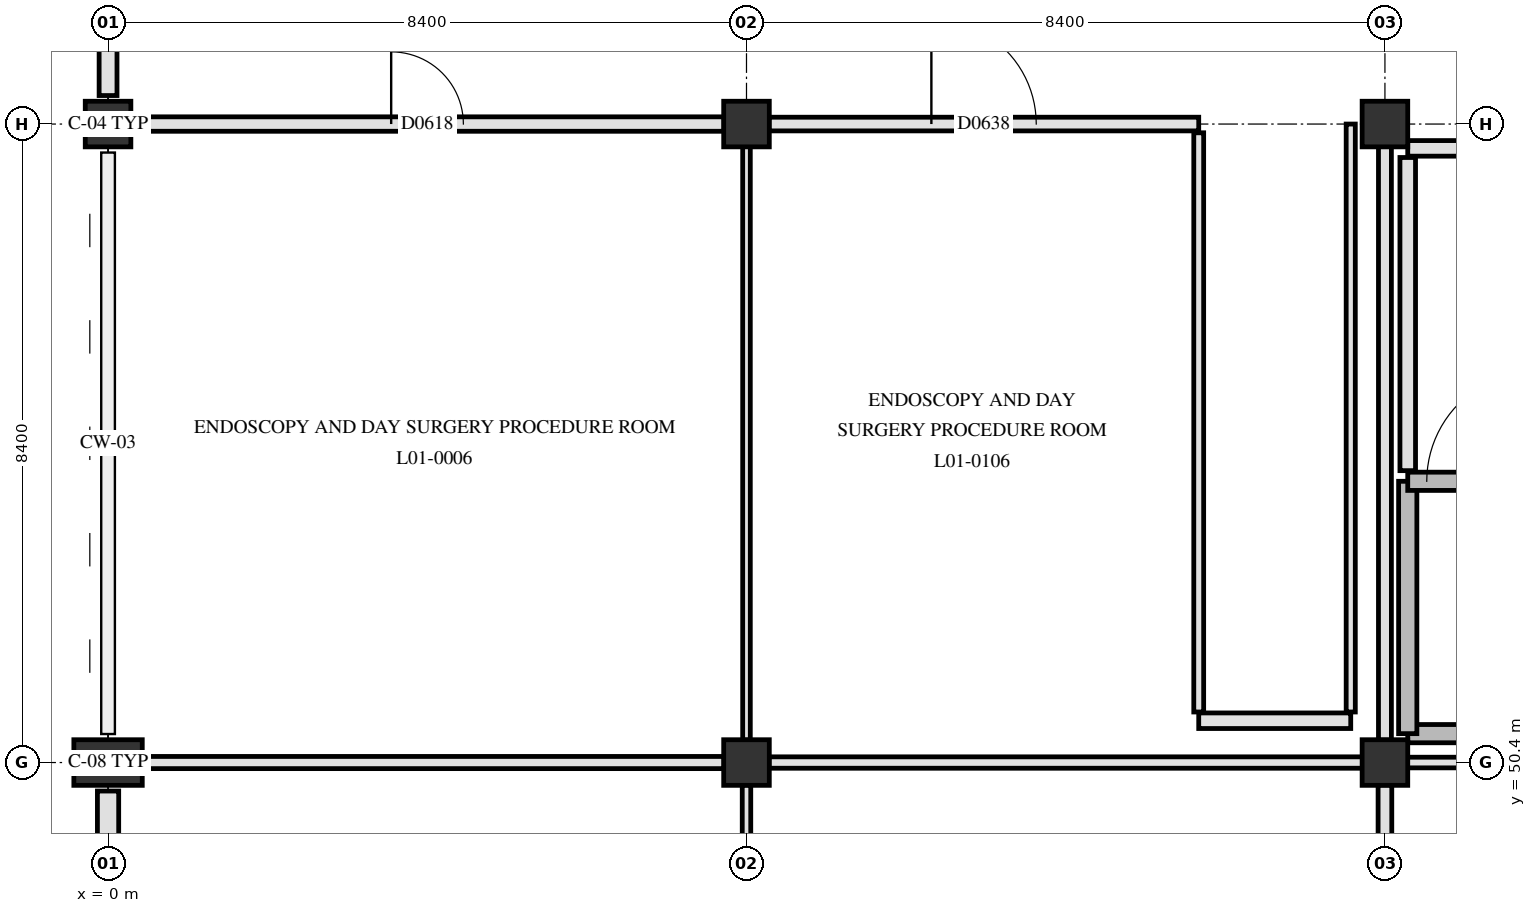
"""IFC4 building model, lengths in metres.
Left out: names, types, materials, properties, quantities, classifications, styles, units other than length and angle.
Written with IfcOpenShell. Run it as: python <this file> out.ifc"""

import sys

from ifc_helpers import new_model, si_unit, direction, frame, frame_2d, origin, origin_2d, place, context, subcontext, project, spatial, rectangle, extrude, element, fill, save


model = new_model("IFC4")
c1 = context("Model", 3, precision=1e-05, world=origin(), true_north=direction((0.0, 1.0)))
c2 = subcontext(c1, "Body", "Model", "MODEL_VIEW")
j1 = project(units=[si_unit("LENGTHUNIT", "METRE"), si_unit("PLANEANGLEUNIT", "RADIAN")], contexts=[c1])
p1 = place(None, origin())
s1 = spatial("IfcSite", under=j1, at=p1, CompositionType="ELEMENT")
p2 = place(p1, origin())
s2 = spatial("IfcBuilding", under=s1, at=p2, CompositionType="ELEMENT")
p3 = place(p2, frame((0.0, 0.0, 4.8)))
s3 = spatial("IfcBuildingStorey", under=s2, at=p3, CompositionType="ELEMENT", Elevation=4.8)
p4 = place(p3, frame((0.0, 50.4, 0.0), z_axis=(0.0, 0.0, 1.0), x_axis=(0.0, 1.0, 0.0)))
e1 = element("IfcColumn", 1, at=p4, inside=s3, PredefinedType="PILASTER", context=c2, shape_type="SweptSolid", body=[
    extrude(rectangle(XDim=0.6, YDim=0.9, at=origin_2d()), origin(), (0.0, 0.0, 1.0), 4.5),
])
for number, where, z_axis, x_axis in (
    (2, (0.0, 58.8, 0.0), (0.0, 0.0, 1.0), (1.0, 0.0, 0.0)),
    (3, (8.4, 50.4, 0.0), (0.0, 0.0, 1.0), (1.0, 0.0, 0.0)),
    (4, (8.4, 58.8, 0.0), (0.0, 0.0, 1.0), (1.0, 0.0, 0.0)),
    (5, (16.8, 50.4, 0.0), (0.0, 0.0, 1.0), (1.0, 0.0, 0.0)),
    (6, (16.8, 58.8, 0.0), (0.0, 0.0, 1.0), (1.0, 0.0, 0.0)),
):
    element("IfcColumn", number, at=place(p3, frame(where, z_axis=z_axis, x_axis=x_axis)), inside=s3, PredefinedType="COLUMN", context=c2, shape_type="SweptSolid", body=[
        extrude(rectangle(XDim=0.6, YDim=0.6, at=origin_2d()), origin(), (0.0, 0.0, 1.0), 4.5),
    ])
p5 = place(p3, frame((0.0, 59.175, 0.0), z_axis=(0.0, 0.0, 1.0), x_axis=(0.0, 1.0, 0.0)))
e7 = element("IfcWall", 7, at=p5, inside=s3, PredefinedType="SOLIDWALL", context=c2, shape_type="SweptSolid", body=[
    extrude(rectangle(XDim=7.65, YDim=0.235, at=frame_2d((3.825, 0.0))), origin(), (0.0, 0.0, 1.0), 3.44),
])
p6 = place(p5, frame((1.137, 0.0, 0.85)))
e8 = element("IfcOpeningElement", 8, at=p6, cuts=e7, PredefinedType="OPENING", context=c2, shape_type="SweptSolid", body=[
    extrude(rectangle(XDim=1.55, YDim=1.54, at=frame_2d((0.775, 0.77))), frame((0.0, 0.127, 0.0), z_axis=(0.0, -1.0, 0.0), x_axis=(1.0, 0.0, 0.0)), (0.0, 0.0, 1.0), 0.255),
])
p7 = place(p5, frame((4.913, 0.0, 0.85)))
e9 = element("IfcOpeningElement", 9, at=p7, cuts=e7, PredefinedType="OPENING", context=c2, shape_type="SweptSolid", body=[
    extrude(rectangle(XDim=1.65, YDim=1.54, at=frame_2d((0.825, 0.77))), frame((0.0, 0.127, 0.0), z_axis=(0.0, -1.0, 0.0), x_axis=(1.0, 0.0, 0.0)), (0.0, 0.0, 1.0), 0.255),
])
p8 = place(p3, frame((0.0, 42.255, 0.0), z_axis=(0.0, 0.0, 1.0), x_axis=(0.0, 1.0, 0.0)))
e10 = element("IfcWall", 10, at=p8, inside=s3, PredefinedType="SOLIDWALL", context=c2, shape_type="SweptSolid", body=[
    extrude(rectangle(XDim=7.77, YDim=0.28, at=frame_2d((3.885, 0.0))), origin(), (0.0, 0.0, 1.0), 3.44),
])
p9 = place(p8, frame((1.218, 0.0, 0.85)))
e11 = element("IfcOpeningElement", 11, at=p9, cuts=e10, PredefinedType="OPENING", context=c2, shape_type="SweptSolid", body=[
    extrude(rectangle(XDim=1.45, YDim=1.3, at=frame_2d((0.725, 0.65))), frame((0.0, 0.15, 0.0), z_axis=(0.0, -1.0, 0.0), x_axis=(1.0, 0.0, 0.0)), (0.0, 0.0, 1.0), 0.3),
])
p10 = place(p8, frame((5.052, 0.0, 0.85)))
e12 = element("IfcOpeningElement", 12, at=p10, cuts=e10, PredefinedType="OPENING", context=c2, shape_type="SweptSolid", body=[
    extrude(rectangle(XDim=1.55, YDim=1.3, at=frame_2d((0.775, 0.65))), frame((0.0, 0.15, 0.0), z_axis=(0.0, -1.0, 0.0), x_axis=(1.0, 0.0, 0.0)), (0.0, 0.0, 1.0), 0.3),
])
p11 = place(p3, frame((17.1, 50.78, 0.0), z_axis=(0.0, 0.0, 1.0), x_axis=(1.0, 0.0, 0.0)))
e13 = element("IfcWall", 13, at=p11, inside=s3, PredefinedType="SHEAR", context=c2, shape_type="SweptSolid", body=[
    extrude(rectangle(XDim=7.82, YDim=0.24, at=frame_2d((3.91, 0.0))), origin(), (0.0, 0.0, 1.0), 4.15),
])
p12 = place(p3, frame((17.1, 50.78, 0.0), z_axis=(0.0, 0.0, 1.0), x_axis=(0.0, 1.0, 0.0)))
e14 = element("IfcWall", 14, at=p12, inside=s3, PredefinedType="SHEAR", context=c2, shape_type="SweptSolid", body=[
    extrude(rectangle(XDim=3.32, YDim=0.24, at=frame_2d((1.66, 0.0))), origin(), (0.0, 0.0, 1.0), 4.15),
])
p13 = place(p3, frame((17.1, 54.1, 0.0), z_axis=(0.0, 0.0, 1.0), x_axis=(1.0, 0.0, 0.0)))
e15 = element("IfcWall", 15, at=p13, inside=s3, PredefinedType="SHEAR", context=c2, shape_type="SweptSolid", body=[
    extrude(rectangle(XDim=7.82, YDim=0.24, at=frame_2d((3.91, 0.0))), origin(), (0.0, 0.0, 1.0), 4.15),
])
p14 = place(p13, frame((0.25, 0.0, 0.0)))
e16 = element("IfcOpeningElement", 16, at=p14, cuts=e15, PredefinedType="OPENING", context=c2, shape_type="SweptSolid", body=[
    extrude(rectangle(XDim=1.45, YDim=2.2, at=frame_2d((0.725, 1.1))), frame((0.0, 0.13, 0.0), z_axis=(0.0, -1.0, 0.0), x_axis=(1.0, 0.0, 0.0)), (0.0, 0.0, 1.0), 0.26),
])
p15 = place(p3, frame((17.1, 54.24, 0.0), z_axis=(0.0, 0.0, 1.0), x_axis=(0.0, 1.0, 0.0)))
e17 = element("IfcWall", 17, at=p15, inside=s3, PredefinedType="PARTITIONING", context=c2, shape_type="SweptSolid", body=[
    extrude(rectangle(XDim=4.12, YDim=0.205, at=frame_2d((2.06, 0.0))), origin(), (0.0, 0.0, 1.0), 3.59),
])
p16 = place(p3, frame((17.1, 58.48, 0.0), z_axis=(0.0, 0.0, 1.0), x_axis=(1.0, 0.0, 0.0)))
e18 = element("IfcWall", 18, at=p16, inside=s3, PredefinedType="PARTITIONING", context=c2, shape_type="SweptSolid", body=[
    extrude(rectangle(XDim=4.18, YDim=0.205, at=frame_2d((2.09, 0.0))), origin(), (0.0, 0.0, 1.0), 3.54),
])
p17 = place(p16, frame((1.29, 0.0, 0.0)))
e19 = element("IfcOpeningElement", 19, at=p17, cuts=e18, PredefinedType="OPENING", context=c2, shape_type="SweptSolid", body=[
    extrude(rectangle(XDim=1.6, YDim=2.25, at=frame_2d((0.8, 1.125))), frame((0.0, 0.113, 0.0), z_axis=(0.0, -1.0, 0.0), x_axis=(1.0, 0.0, 0.0)), (0.0, 0.0, 1.0), 0.225),
])
p18 = place(p3, frame((0.295, 50.4, 0.0), z_axis=(0.0, 0.0, 1.0), x_axis=(1.0, 0.0, 0.0)))
e20 = element("IfcWall", 20, at=p18, inside=s3, PredefinedType="PARTITIONING", context=c2, shape_type="SweptSolid", body=[
    extrude(rectangle(XDim=7.81, YDim=0.16, at=frame_2d((3.905, 0.0))), origin(), (0.0, 0.0, 1.0), 3.54),
])
p19 = place(p3, frame((8.695, 50.4, 0.0), z_axis=(0.0, 0.0, 1.0), x_axis=(1.0, 0.0, 0.0)))
e21 = element("IfcWall", 21, at=p19, inside=s3, PredefinedType="PARTITIONING", context=c2, shape_type="SweptSolid", body=[
    extrude(rectangle(XDim=7.81, YDim=0.15, at=frame_2d((3.905, 0.0))), origin(), (0.0, 0.0, 1.0), 3.54),
])
p20 = place(p3, frame((17.095, 50.4, 0.0), z_axis=(0.0, 0.0, 1.0), x_axis=(1.0, 0.0, 0.0)))
e22 = element("IfcWall", 22, at=p20, inside=s3, PredefinedType="PARTITIONING", context=c2, shape_type="SweptSolid", body=[
    extrude(rectangle(XDim=7.81, YDim=0.14, at=frame_2d((3.905, 0.0))), origin(), (0.0, 0.0, 1.0), 3.54),
])
p21 = place(p3, frame((14.35, 50.95, 0.0), z_axis=(0.0, 0.0, 1.0), x_axis=(1.0, 0.0, 0.0)))
e23 = element("IfcWall", 23, at=p21, inside=s3, PredefinedType="PARTITIONING", context=c2, shape_type="SweptSolid", body=[
    extrude(rectangle(XDim=2.0, YDim=0.205, at=frame_2d((1.0, 0.0))), origin(), (0.0, 0.0, 1.0), 4.14),
])
p22 = place(p3, frame((0.295, 58.8, 0.0), z_axis=(0.0, 0.0, 1.0), x_axis=(1.0, 0.0, 0.0)))
e24 = element("IfcWall", 24, at=p22, inside=s3, PredefinedType="PARTITIONING", context=c2, shape_type="SweptSolid", body=[
    extrude(rectangle(XDim=7.81, YDim=0.19, at=frame_2d((3.905, 0.0))), origin(), (0.0, 0.0, 1.0), 3.54),
])
p23 = place(p22, frame((3.43, 0.0, 0.0)))
e25 = element("IfcOpeningElement", 25, at=p23, cuts=e24, PredefinedType="OPENING", context=c2, shape_type="SweptSolid", body=[
    extrude(rectangle(XDim=0.95, YDim=2.1, at=frame_2d((0.475, 1.05))), frame((0.0, 0.105, 0.0), z_axis=(0.0, -1.0, 0.0), x_axis=(1.0, 0.0, 0.0)), (0.0, 0.0, 1.0), 0.21),
])
p24 = place(p3, frame((8.695, 58.8, 0.0), z_axis=(0.0, 0.0, 1.0), x_axis=(1.0, 0.0, 0.0)))
e26 = element("IfcWall", 26, at=p24, inside=s3, PredefinedType="PARTITIONING", context=c2, shape_type="SweptSolid", body=[
    extrude(rectangle(XDim=5.655, YDim=0.18, at=frame_2d((2.828, 0.0))), origin(), (0.0, 0.0, 1.0), 3.54),
])
p25 = place(p24, frame((2.137, 0.0, 0.0)))
e27 = element("IfcOpeningElement", 27, at=p25, cuts=e26, PredefinedType="OPENING", context=c2, shape_type="SweptSolid", body=[
    extrude(rectangle(XDim=1.38, YDim=2.22, at=frame_2d((0.69, 1.11))), frame((0.0, 0.1, 0.0), z_axis=(0.0, -1.0, 0.0), x_axis=(1.0, 0.0, 0.0)), (0.0, 0.0, 1.0), 0.2),
])
p26 = place(p3, frame((8.4, 44.715, 0.0), z_axis=(0.0, 0.0, 1.0), x_axis=(0.0, 1.0, 0.0)))
e28 = element("IfcWall", 28, at=p26, inside=s3, PredefinedType="PARTITIONING", context=c2, shape_type="SweptSolid", body=[
    extrude(rectangle(XDim=5.39, YDim=0.112, at=frame_2d((2.695, 0.0))), origin(), (0.0, 0.0, 1.0), 3.59),
])
p27 = place(p3, frame((8.4, 50.695, 0.0), z_axis=(0.0, 0.0, 1.0), x_axis=(0.0, 1.0, 0.0)))
e29 = element("IfcWall", 29, at=p27, inside=s3, PredefinedType="PARTITIONING", context=c2, shape_type="SweptSolid", body=[
    extrude(rectangle(XDim=7.81, YDim=0.1, at=frame_2d((3.905, 0.0))), origin(), (0.0, 0.0, 1.0), 3.59),
])
p28 = place(p3, frame((14.35, 51.065, 0.0), z_axis=(0.0, 0.0, 1.0), x_axis=(0.0, 1.0, 0.0)))
e30 = element("IfcWall", 30, at=p28, inside=s3, PredefinedType="PARTITIONING", context=c2, shape_type="SweptSolid", body=[
    extrude(rectangle(XDim=7.62, YDim=0.13, at=frame_2d((3.81, 0.0))), origin(), (0.0, 0.0, 1.0), 3.54),
])
p29 = place(p3, frame((16.35, 51.065, 0.0), z_axis=(0.0, 0.0, 1.0), x_axis=(0.0, 1.0, 0.0)))
e31 = element("IfcWall", 31, at=p29, inside=s3, PredefinedType="PARTITIONING", context=c2, shape_type="SweptSolid", body=[
    extrude(rectangle(XDim=7.735, YDim=0.12, at=frame_2d((3.868, 0.0))), origin(), (0.0, 0.0, 1.0), 3.54),
])
p30 = place(p3, frame((16.8, 44.715, 0.0), z_axis=(0.0, 0.0, 1.0), x_axis=(0.0, 1.0, 0.0)))
e32 = element("IfcWall", 32, at=p30, inside=s3, PredefinedType="PARTITIONING", context=c2, shape_type="SweptSolid", body=[
    extrude(rectangle(XDim=5.39, YDim=0.18, at=frame_2d((2.695, 0.0))), origin(), (0.0, 0.0, 1.0), 3.59),
])
p31 = place(p3, frame((16.8, 50.695, 0.0), z_axis=(0.0, 0.0, 1.0), x_axis=(0.0, 1.0, 0.0)))
e33 = element("IfcWall", 33, at=p31, inside=s3, PredefinedType="PARTITIONING", context=c2, shape_type="SweptSolid", body=[
    extrude(rectangle(XDim=7.81, YDim=0.17, at=frame_2d((3.905, 0.0))), origin(), (0.0, 0.0, 1.0), 3.59),
])
p32 = place(p14, origin())
e34 = element("IfcDoor", 34, at=p32, inside=s3, OperationType="SINGLE_SWING_RIGHT", PredefinedType="DOOR", context=c2, shape_type="SweptSolid", body=[
    extrude(rectangle(XDim=1.45, YDim=2.2, at=frame_2d((0.725, 1.1))), frame((0.0, 0.025, 0.0), z_axis=(0.0, -1.0, 0.0), x_axis=(1.0, 0.0, 0.0)), (0.0, 0.0, 1.0), 0.05),
])
fill(e16, e34)
p33 = place(p23, origin())
e35 = element("IfcDoor", 35, at=p33, inside=s3, OperationType="SINGLE_SWING_LEFT", PredefinedType="DOOR", context=c2, shape_type="SweptSolid", body=[
    extrude(rectangle(XDim=0.95, YDim=2.1, at=frame_2d((0.475, 1.05))), frame((0.0, 0.025, 0.0), z_axis=(0.0, -1.0, 0.0), x_axis=(1.0, 0.0, 0.0)), (0.0, 0.0, 1.0), 0.05),
])
fill(e25, e35)
p34 = place(p25, origin())
e36 = element("IfcDoor", 36, at=p34, inside=s3, OperationType="SINGLE_SWING_LEFT", PredefinedType="DOOR", context=c2, shape_type="SweptSolid", body=[
    extrude(rectangle(XDim=1.38, YDim=2.22, at=frame_2d((0.69, 1.11))), frame((0.0, 0.025, 0.0), z_axis=(0.0, -1.0, 0.0), x_axis=(1.0, 0.0, 0.0)), (0.0, 0.0, 1.0), 0.05),
])
fill(e27, e36)
save(model, sys.argv[1])
